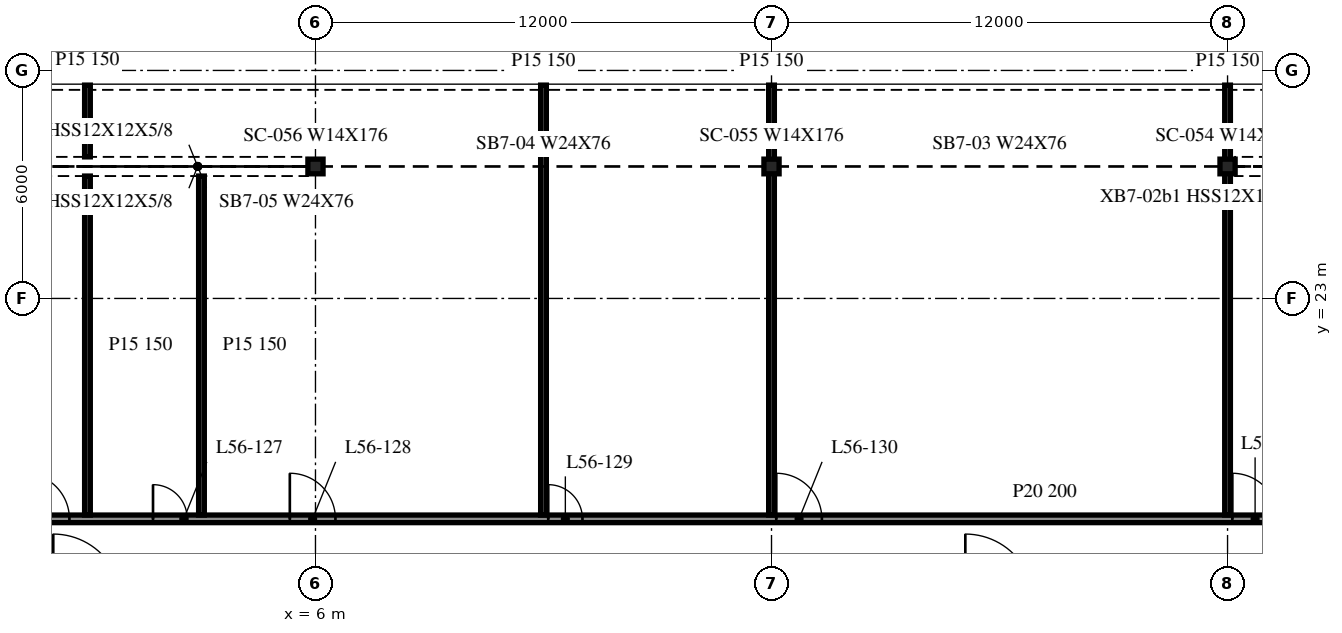
"""IFC4 building model, lengths in metres.
Left out: names, types, materials, properties, quantities, classifications, styles, units other than length and angle.
Written with IfcOpenShell. Run it as: python <this file> out.ifc"""

import sys

from ifc_helpers import new_model, si_unit, direction, frame, frame_2d, origin, origin_2d, place, context, subcontext, project, spatial, rectangle, i_section, extrude, element, fill, save


model = new_model("IFC4")
c1 = context("Model", 3, precision=1e-05, world=origin(), true_north=direction((0.0, 1.0)))
c2 = subcontext(c1, "Body", "Model", "MODEL_VIEW")
j1 = project(units=[si_unit("LENGTHUNIT", "METRE"), si_unit("PLANEANGLEUNIT", "RADIAN")], contexts=[c1])
p1 = place(None, origin())
s1 = spatial("IfcSite", under=j1, at=p1, CompositionType="ELEMENT")
p2 = place(p1, origin())
s2 = spatial("IfcBuilding", under=s1, at=p2, CompositionType="ELEMENT")
p3 = place(p2, frame((0.0, 0.0, 232.4)))
s3 = spatial("IfcBuildingStorey", under=s2, at=p3, CompositionType="ELEMENT", Elevation=232.4)
for number, where, z_axis, x_axis in (
    (1, (30.0, 26.473, -0.34), (0.0, 0.0, 1.0), (1.0, 0.0, 0.0)),
    (2, (18.0, 26.473, -0.34), (0.0, 0.0, 1.0), (1.0, 0.0, 0.0)),
    (3, (6.0, 26.473, -0.34), (0.0, 0.0, 1.0), (1.0, 0.0, 0.0)),
):
    element("IfcColumn", number, at=place(p3, frame(where, z_axis=z_axis, x_axis=x_axis)), inside=s3, PredefinedType="COLUMN", context=c2, shape_type="SweptSolid", body=[
        extrude(i_section(OverallWidth=0.399, OverallDepth=0.386, WebThickness=0.021, FlangeThickness=0.033, at=origin_2d()), origin(), (0.0, 0.0, 1.0), 3.8),
    ])
p4 = place(p3, frame((-41.975, 17.2, 0.0), z_axis=(0.0, 0.0, 1.0), x_axis=(1.0, 0.0, 0.0)))
e4 = element("IfcWall", 4, at=p4, inside=s3, PredefinedType="PARTITIONING", context=c2, shape_type="SweptSolid", body=[
    extrude(rectangle(XDim=95.95, YDim=0.2, at=frame_2d((47.975, 0.0))), origin(), (0.0, 0.0, 1.0), 3.46),
])
p5 = place(p4, frame((10.7, 0.0, 0.0)))
e5 = element("IfcOpeningElement", 5, at=p5, cuts=e4, PredefinedType="OPENING", context=c2, shape_type="SweptSolid", body=[
    extrude(rectangle(XDim=0.9, YDim=2.1, at=frame_2d((0.45, 1.05))), frame((0.0, 0.11, 0.0), z_axis=(0.0, -1.0, 0.0), x_axis=(1.0, 0.0, 0.0)), (0.0, 0.0, 1.0), 0.22),
])
p6 = place(p4, frame((13.3, 0.0, 0.0)))
e6 = element("IfcOpeningElement", 6, at=p6, cuts=e4, PredefinedType="OPENING", context=c2, shape_type="SweptSolid", body=[
    extrude(rectangle(XDim=1.2, YDim=2.1, at=frame_2d((0.6, 1.05))), frame((0.0, 0.11, 0.0), z_axis=(0.0, -1.0, 0.0), x_axis=(1.0, 0.0, 0.0)), (0.0, 0.0, 1.0), 0.22),
])
p7 = place(p4, frame((22.7, 0.0, 0.0)))
e7 = element("IfcOpeningElement", 7, at=p7, cuts=e4, PredefinedType="OPENING", context=c2, shape_type="SweptSolid", body=[
    extrude(rectangle(XDim=0.9, YDim=2.1, at=frame_2d((0.45, 1.05))), frame((0.0, 0.11, 0.0), z_axis=(0.0, -1.0, 0.0), x_axis=(1.0, 0.0, 0.0)), (0.0, 0.0, 1.0), 0.22),
])
p8 = place(p4, frame((28.3, 0.0, 0.0)))
e8 = element("IfcOpeningElement", 8, at=p8, cuts=e4, PredefinedType="OPENING", context=c2, shape_type="SweptSolid", body=[
    extrude(rectangle(XDim=1.2, YDim=2.1, at=frame_2d((0.6, 1.05))), frame((0.0, 0.11, 0.0), z_axis=(0.0, -1.0, 0.0), x_axis=(1.0, 0.0, 0.0)), (0.0, 0.0, 1.0), 0.22),
])
p9 = place(p4, frame((40.3, 0.0, 0.0)))
e9 = element("IfcOpeningElement", 9, at=p9, cuts=e4, PredefinedType="OPENING", context=c2, shape_type="SweptSolid", body=[
    extrude(rectangle(XDim=1.2, YDim=2.1, at=frame_2d((0.6, 1.05))), frame((0.0, 0.11, 0.0), z_axis=(0.0, -1.0, 0.0), x_axis=(1.0, 0.0, 0.0)), (0.0, 0.0, 1.0), 0.22),
])
p10 = place(p4, frame((43.7, 0.0, 0.0)))
e10 = element("IfcOpeningElement", 10, at=p10, cuts=e4, PredefinedType="OPENING", context=c2, shape_type="SweptSolid", body=[
    extrude(rectangle(XDim=0.9, YDim=2.1, at=frame_2d((0.45, 1.05))), frame((0.0, 0.11, 0.0), z_axis=(0.0, -1.0, 0.0), x_axis=(1.0, 0.0, 0.0)), (0.0, 0.0, 1.0), 0.22),
])
p11 = place(p4, frame((47.3, 0.0, 0.0)))
e11 = element("IfcOpeningElement", 11, at=p11, cuts=e4, PredefinedType="OPENING", context=c2, shape_type="SweptSolid", body=[
    extrude(rectangle(XDim=1.2, YDim=2.1, at=frame_2d((0.6, 1.05))), frame((0.0, 0.11, 0.0), z_axis=(0.0, -1.0, 0.0), x_axis=(1.0, 0.0, 0.0)), (0.0, 0.0, 1.0), 0.22),
])
p12 = place(p4, frame((54.1, 0.0, 0.0)))
e12 = element("IfcOpeningElement", 12, at=p12, cuts=e4, PredefinedType="OPENING", context=c2, shape_type="SweptSolid", body=[
    extrude(rectangle(XDim=0.9, YDim=2.1, at=frame_2d((0.45, 1.05))), frame((0.0, 0.11, 0.0), z_axis=(0.0, -1.0, 0.0), x_axis=(1.0, 0.0, 0.0)), (0.0, 0.0, 1.0), 0.22),
])
p13 = place(p4, frame((60.1, 0.0, 0.0)))
e13 = element("IfcOpeningElement", 13, at=p13, cuts=e4, PredefinedType="OPENING", context=c2, shape_type="SweptSolid", body=[
    extrude(rectangle(XDim=1.2, YDim=2.1, at=frame_2d((0.6, 1.05))), frame((0.0, 0.11, 0.0), z_axis=(0.0, -1.0, 0.0), x_axis=(1.0, 0.0, 0.0)), (0.0, 0.0, 1.0), 0.22),
])
p14 = place(p4, frame((72.1, 0.0, 0.0)))
e14 = element("IfcOpeningElement", 14, at=p14, cuts=e4, PredefinedType="OPENING", context=c2, shape_type="SweptSolid", body=[
    extrude(rectangle(XDim=1.2, YDim=2.1, at=frame_2d((0.6, 1.05))), frame((0.0, 0.11, 0.0), z_axis=(0.0, -1.0, 0.0), x_axis=(1.0, 0.0, 0.0)), (0.0, 0.0, 1.0), 0.22),
])
p15 = place(p4, frame((75.1, 0.0, 0.0)))
e15 = element("IfcOpeningElement", 15, at=p15, cuts=e4, PredefinedType="OPENING", context=c2, shape_type="SweptSolid", body=[
    extrude(rectangle(XDim=0.9, YDim=2.1, at=frame_2d((0.45, 1.05))), frame((0.0, 0.11, 0.0), z_axis=(0.0, -1.0, 0.0), x_axis=(1.0, 0.0, 0.0)), (0.0, 0.0, 1.0), 0.22),
])
p16 = place(p4, frame((84.1, 0.0, 0.0)))
e16 = element("IfcOpeningElement", 16, at=p16, cuts=e4, PredefinedType="OPENING", context=c2, shape_type="SweptSolid", body=[
    extrude(rectangle(XDim=1.2, YDim=2.1, at=frame_2d((0.6, 1.05))), frame((0.0, 0.11, 0.0), z_axis=(0.0, -1.0, 0.0), x_axis=(1.0, 0.0, 0.0)), (0.0, 0.0, 1.0), 0.22),
])
p17 = place(p4, frame((90.1, 0.0, 0.0)))
e17 = element("IfcOpeningElement", 17, at=p17, cuts=e4, PredefinedType="OPENING", context=c2, shape_type="SweptSolid", body=[
    extrude(rectangle(XDim=0.9, YDim=2.1, at=frame_2d((0.45, 1.05))), frame((0.0, 0.11, 0.0), z_axis=(0.0, -1.0, 0.0), x_axis=(1.0, 0.0, 0.0)), (0.0, 0.0, 1.0), 0.22),
])
p18 = place(p3, frame((0.0, 17.3, 0.0), z_axis=(0.0, 0.0, 1.0), x_axis=(0.0, 1.0, 0.0)))
e18 = element("IfcWall", 18, at=p18, inside=s3, PredefinedType="PARTITIONING", context=c2, shape_type="SweptSolid", body=[
    extrude(rectangle(XDim=8.921, YDim=0.15, at=frame_2d((4.46, 0.0))), origin(), (0.0, 0.0, 1.0), 3.46),
])
p19 = place(p3, frame((0.0, 26.725, 0.0), z_axis=(0.0, 0.0, 1.0), x_axis=(0.0, 1.0, 0.0)))
e19 = element("IfcWall", 19, at=p19, inside=s3, PredefinedType="PARTITIONING", context=c2, shape_type="SweptSolid", body=[
    extrude(rectangle(XDim=1.889, YDim=0.15, at=frame_2d((0.944, 0.0))), origin(), (0.0, 0.0, 1.0), 3.46),
])
p20 = place(p3, frame((3.0, 17.3, 0.0), z_axis=(0.0, 0.0, 1.0), x_axis=(0.0, 1.0, 0.0)))
e20 = element("IfcWall", 20, at=p20, inside=s3, PredefinedType="PARTITIONING", context=c2, shape_type="SweptSolid", body=[
    extrude(rectangle(XDim=8.921, YDim=0.15, at=frame_2d((4.46, 0.0))), origin(), (0.0, 0.0, 1.0), 3.46),
])
for number, where, z_axis, x_axis in (
    (21, (12.0, 17.3, 0.0), (0.0, 0.0, 1.0), (0.0, 1.0, 0.0)),
    (22, (18.0, 17.3, 0.0), (0.0, 0.0, 1.0), (0.0, 1.0, 0.0)),
    (23, (30.0, 17.3, 0.0), (0.0, 0.0, 1.0), (0.0, 1.0, 0.0)),
):
    element("IfcWall", number, at=place(p3, frame(where, z_axis=z_axis, x_axis=x_axis)), inside=s3, PredefinedType="PARTITIONING", context=c2, shape_type="SweptSolid", body=[
        extrude(rectangle(XDim=11.314, YDim=0.15, at=frame_2d((5.657, 0.0))), origin(), (0.0, 0.0, 1.0), 3.46),
    ])
p21 = place(p9, origin())
e24 = element("IfcDoor", 24, at=p21, inside=s3, OperationType="SINGLE_SWING_LEFT", PredefinedType="DOOR", context=c2, shape_type="SweptSolid", body=[
    extrude(rectangle(XDim=1.2, YDim=2.1, at=frame_2d((0.6, 1.05))), frame((0.0, 0.025, 0.0), z_axis=(0.0, -1.0, 0.0), x_axis=(1.0, 0.0, 0.0)), (0.0, 0.0, 1.0), 0.05),
])
fill(e9, e24)
p22 = place(p10, origin())
e25 = element("IfcDoor", 25, at=p22, inside=s3, OperationType="SINGLE_SWING_LEFT", PredefinedType="DOOR", context=c2, shape_type="SweptSolid", body=[
    extrude(rectangle(XDim=0.9, YDim=2.1, at=frame_2d((0.45, 1.05))), frame((0.0, 0.025, 0.0), z_axis=(0.0, -1.0, 0.0), x_axis=(1.0, 0.0, 0.0)), (0.0, 0.0, 1.0), 0.05),
])
fill(e10, e25)
p23 = place(p11, origin())
e26 = element("IfcDoor", 26, at=p23, inside=s3, OperationType="SINGLE_SWING_RIGHT", PredefinedType="DOOR", context=c2, shape_type="SweptSolid", body=[
    extrude(rectangle(XDim=1.2, YDim=2.1, at=frame_2d((0.6, 1.05))), frame((0.0, 0.025, 0.0), z_axis=(0.0, -1.0, 0.0), x_axis=(1.0, 0.0, 0.0)), (0.0, 0.0, 1.0), 0.05),
])
fill(e11, e26)
p24 = place(p12, origin())
e27 = element("IfcDoor", 27, at=p24, inside=s3, OperationType="SINGLE_SWING_RIGHT", PredefinedType="DOOR", context=c2, shape_type="SweptSolid", body=[
    extrude(rectangle(XDim=0.9, YDim=2.1, at=frame_2d((0.45, 1.05))), frame((0.0, 0.025, 0.0), z_axis=(0.0, -1.0, 0.0), x_axis=(1.0, 0.0, 0.0)), (0.0, 0.0, 1.0), 0.05),
])
fill(e12, e27)
p25 = place(p13, origin())
e28 = element("IfcDoor", 28, at=p25, inside=s3, OperationType="SINGLE_SWING_RIGHT", PredefinedType="DOOR", context=c2, shape_type="SweptSolid", body=[
    extrude(rectangle(XDim=1.2, YDim=2.1, at=frame_2d((0.6, 1.05))), frame((0.0, 0.025, 0.0), z_axis=(0.0, -1.0, 0.0), x_axis=(1.0, 0.0, 0.0)), (0.0, 0.0, 1.0), 0.05),
])
fill(e13, e28)
p26 = place(p14, origin())
e29 = element("IfcDoor", 29, at=p26, inside=s3, OperationType="SINGLE_SWING_RIGHT", PredefinedType="DOOR", context=c2, shape_type="SweptSolid", body=[
    extrude(rectangle(XDim=1.2, YDim=2.1, at=frame_2d((0.6, 1.05))), frame((0.0, 0.025, 0.0), z_axis=(0.0, -1.0, 0.0), x_axis=(1.0, 0.0, 0.0)), (0.0, 0.0, 1.0), 0.05),
])
fill(e14, e29)
save(model, sys.argv[1])
